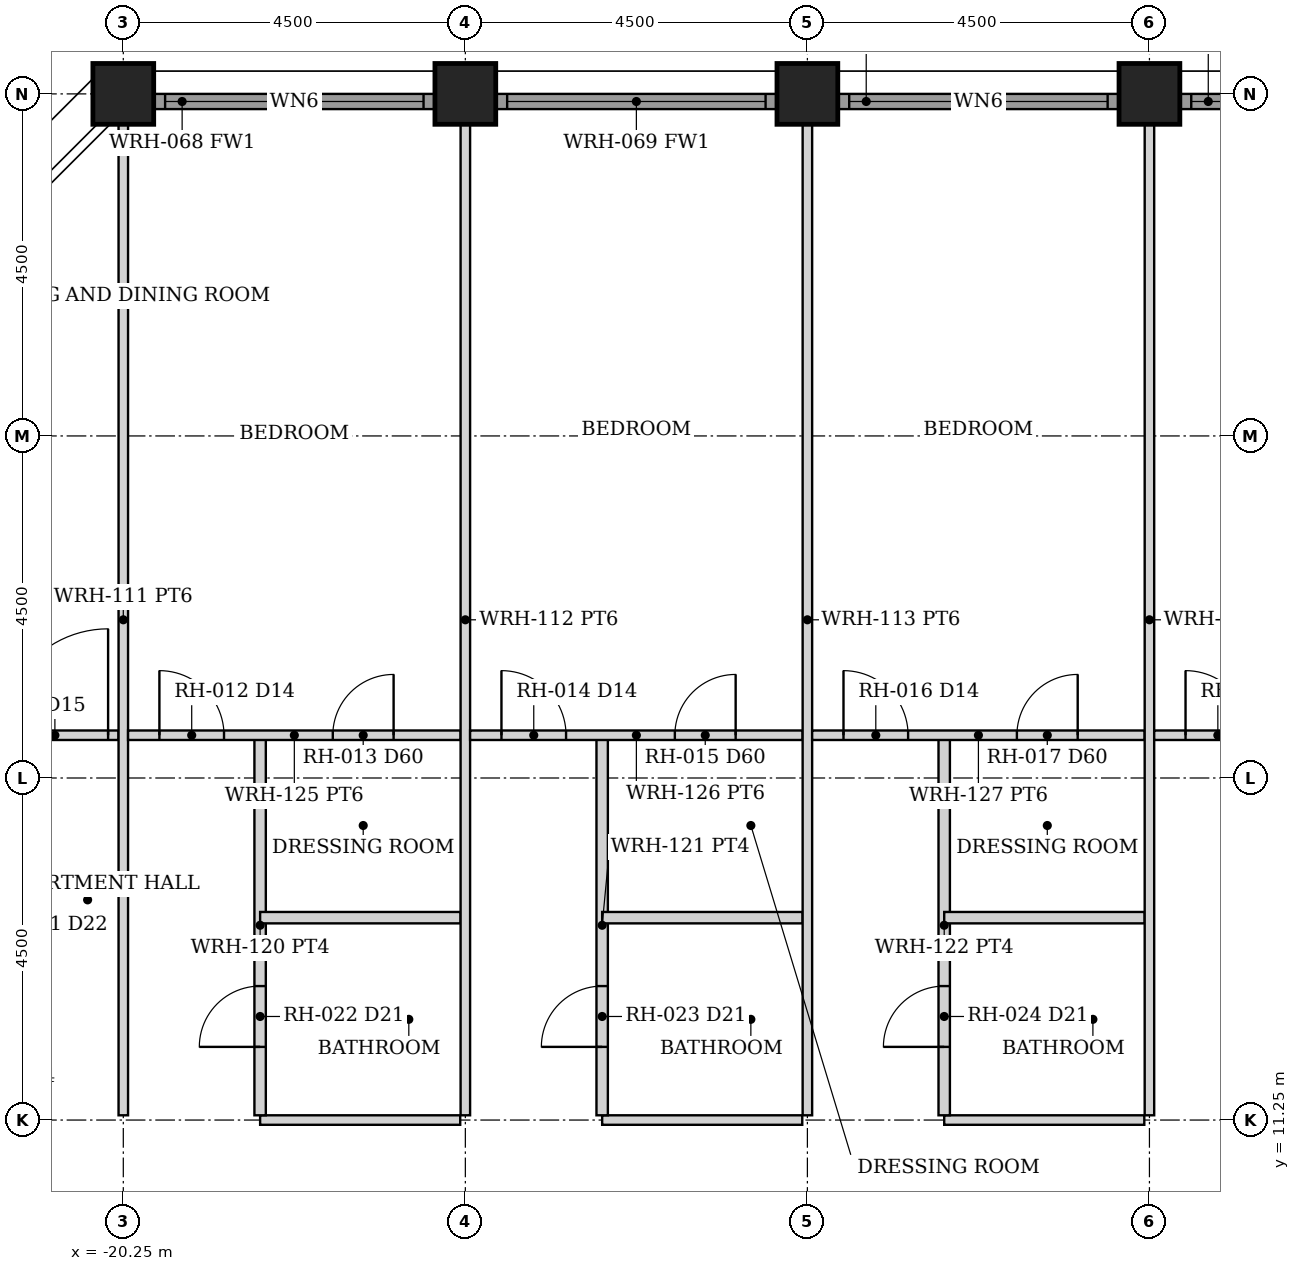
"""IFC4 building model, lengths in metres.
Left out: names, types, materials, properties, quantities, classifications, styles, units other than length and angle.
Written with IfcOpenShell. Run it as: python <this file> out.ifc"""

import sys

from ifc_helpers import new_model, si_unit, direction, frame, frame_2d, origin, origin_2d, place, context, subcontext, project, spatial, rectangle, hollow_rectangle, extrude, element, fill, save


model = new_model("IFC4")
c1 = context("Model", 3, precision=1e-05, world=origin(), true_north=direction((0.0, 1.0)))
c2 = subcontext(c1, "Body", "Model", "MODEL_VIEW")
j1 = project(units=[si_unit("LENGTHUNIT", "METRE"), si_unit("PLANEANGLEUNIT", "RADIAN")], contexts=[c1])
p1 = place(None, origin())
s1 = spatial("IfcSite", under=j1, at=p1, CompositionType="ELEMENT")
p2 = place(p1, origin())
s2 = spatial("IfcBuilding", under=s1, at=p2, CompositionType="ELEMENT")
p3 = place(p2, frame((0.0, 0.0, 103.5)))
s3 = spatial("IfcBuildingStorey", under=s2, at=p3, CompositionType="ELEMENT", Elevation=103.5)
for number, where, z_axis, x_axis in (
    (1, (-20.25, 24.75, 0.0), (0.0, 0.0, 1.0), (0.0, 1.0, 0.0)),
    (2, (-15.75, 24.75, 0.0), (0.0, 0.0, 1.0), (0.0, 1.0, 0.0)),
    (3, (-11.25, 24.75, 0.0), (0.0, 0.0, 1.0), (0.0, 1.0, 0.0)),
    (4, (-6.75, 24.75, 0.0), (0.0, 0.0, 1.0), (0.0, 1.0, 0.0)),
):
    element("IfcColumn", number, at=place(p3, frame(where, z_axis=z_axis, x_axis=x_axis)), inside=s3, PredefinedType="COLUMN", context=c2, shape_type="SweptSolid", body=[
        extrude(hollow_rectangle(XDim=0.8, YDim=0.8, WallThickness=0.06, at=origin_2d()), origin(), (0.0, 0.0, 1.0), 3.5),
    ])
p4 = place(p3, frame((-19.845, 24.65, 0.0), z_axis=(0.0, 0.0, 1.0), x_axis=(1.0, 0.0, 0.0)))
e5 = element("IfcWall", 5, at=p4, inside=s3, PredefinedType="SOLIDWALL", context=c2, shape_type="SweptSolid", body=[
    extrude(rectangle(XDim=3.69, YDim=0.2, at=frame_2d((1.845, 0.0))), origin(), (0.0, 0.0, 1.0), 2.279),
])
p5 = place(p4, frame((0.145, 0.0, 0.3)))
e6 = element("IfcOpeningElement", 6, at=p5, cuts=e5, PredefinedType="OPENING", context=c2, shape_type="SweptSolid", body=[
    extrude(rectangle(XDim=3.4, YDim=1.829, at=frame_2d((1.7, 0.915))), frame((0.0, 0.11, 0.0), z_axis=(0.0, -1.0, 0.0), x_axis=(1.0, 0.0, 0.0)), (0.0, 0.0, 1.0), 0.22),
])
p6 = place(p3, frame((-15.345, 24.65, 0.0), z_axis=(0.0, 0.0, 1.0), x_axis=(1.0, 0.0, 0.0)))
e7 = element("IfcWall", 7, at=p6, inside=s3, PredefinedType="SOLIDWALL", context=c2, shape_type="SweptSolid", body=[
    extrude(rectangle(XDim=3.69, YDim=0.2, at=frame_2d((1.845, 0.0))), origin(), (0.0, 0.0, 1.0), 2.279),
])
p7 = place(p6, frame((0.145, 0.0, 0.3)))
e8 = element("IfcOpeningElement", 8, at=p7, cuts=e7, PredefinedType="OPENING", context=c2, shape_type="SweptSolid", body=[
    extrude(rectangle(XDim=3.4, YDim=1.829, at=frame_2d((1.7, 0.915))), frame((0.0, 0.11, 0.0), z_axis=(0.0, -1.0, 0.0), x_axis=(1.0, 0.0, 0.0)), (0.0, 0.0, 1.0), 0.22),
])
p8 = place(p3, frame((-10.845, 24.65, 0.0), z_axis=(0.0, 0.0, 1.0), x_axis=(1.0, 0.0, 0.0)))
e9 = element("IfcWall", 9, at=p8, inside=s3, PredefinedType="SOLIDWALL", context=c2, shape_type="SweptSolid", body=[
    extrude(rectangle(XDim=3.69, YDim=0.2, at=frame_2d((1.845, 0.0))), origin(), (0.0, 0.0, 1.0), 2.279),
])
p9 = place(p8, frame((0.145, 0.0, 0.3)))
e10 = element("IfcOpeningElement", 10, at=p9, cuts=e9, PredefinedType="OPENING", context=c2, shape_type="SweptSolid", body=[
    extrude(rectangle(XDim=3.4, YDim=1.829, at=frame_2d((1.7, 0.915))), frame((0.0, 0.11, 0.0), z_axis=(0.0, -1.0, 0.0), x_axis=(1.0, 0.0, 0.0)), (0.0, 0.0, 1.0), 0.22),
])
p10 = place(p3, frame((-6.345, 24.65, 0.0), z_axis=(0.0, 0.0, 1.0), x_axis=(1.0, 0.0, 0.0)))
e11 = element("IfcWall", 11, at=p10, inside=s3, PredefinedType="SOLIDWALL", context=c2, shape_type="SweptSolid", body=[
    extrude(rectangle(XDim=3.69, YDim=0.2, at=frame_2d((1.845, 0.0))), origin(), (0.0, 0.0, 1.0), 2.279),
])
p11 = place(p10, frame((0.145, 0.0, 0.3)))
e12 = element("IfcOpeningElement", 12, at=p11, cuts=e11, PredefinedType="OPENING", context=c2, shape_type="SweptSolid", body=[
    extrude(rectangle(XDim=3.4, YDim=1.829, at=frame_2d((1.7, 0.915))), frame((0.0, 0.11, 0.0), z_axis=(0.0, -1.0, 0.0), x_axis=(1.0, 0.0, 0.0)), (0.0, 0.0, 1.0), 0.22),
])
p12 = place(p3, frame((-24.55, 16.312, 0.0), z_axis=(0.0, 0.0, 1.0), x_axis=(1.0, 0.0, 0.0)))
e13 = element("IfcWall", 13, at=p12, inside=s3, PredefinedType="PARTITIONING", context=c2, shape_type="SweptSolid", body=[
    extrude(rectangle(XDim=4.238, YDim=0.125, at=frame_2d((2.119, 0.0))), origin(), (0.0, 0.0, 1.0), 2.279),
])
p13 = place(p12, frame((2.7, 0.0, 0.0)))
e14 = element("IfcOpeningElement", 14, at=p13, cuts=e13, PredefinedType="OPENING", context=c2, shape_type="SweptSolid", body=[
    extrude(rectangle(XDim=1.4, YDim=2.1, at=frame_2d((0.7, 1.05))), frame((0.0, 0.073, 0.0), z_axis=(0.0, -1.0, 0.0), x_axis=(1.0, 0.0, 0.0)), (0.0, 0.0, 1.0), 0.145),
])
p14 = place(p3, frame((-20.25, 11.312, 0.0), z_axis=(0.0, 0.0, 1.0), x_axis=(0.0, 1.0, 0.0)))
e15 = element("IfcWall", 15, at=p14, inside=s3, PredefinedType="PARTITIONING", context=c2, shape_type="SweptSolid", body=[
    extrude(rectangle(XDim=13.038, YDim=0.125, at=frame_2d((6.519, 0.0))), origin(), (0.0, 0.0, 1.0), 2.279),
])
p15 = place(p3, frame((-18.45, 11.25, 0.0), z_axis=(0.0, 0.0, 1.0), x_axis=(1.0, 0.0, 0.0)))
e16 = element("IfcWall", 16, at=p15, inside=s3, PredefinedType="PARTITIONING", context=c2, shape_type="SweptSolid", body=[
    extrude(rectangle(XDim=2.633, YDim=0.125, at=frame_2d((1.316, 0.0))), origin(), (0.0, 0.0, 1.0), 2.279),
])
p16 = place(p3, frame((-18.45, 11.312, 0.0), z_axis=(0.0, 0.0, 1.0), x_axis=(0.0, 1.0, 0.0)))
e17 = element("IfcWall", 17, at=p16, inside=s3, PredefinedType="PARTITIONING", context=c2, shape_type="SweptSolid", body=[
    extrude(rectangle(XDim=5.0, YDim=0.15, at=frame_2d((2.5, 0.0))), origin(), (0.0, 0.0, 1.0), 2.279),
])
p17 = place(p16, frame((0.9, 0.0, 0.0)))
e18 = element("IfcOpeningElement", 18, at=p17, cuts=e17, PredefinedType="OPENING", context=c2, shape_type="SweptSolid", body=[
    extrude(rectangle(XDim=0.8, YDim=2.1, at=frame_2d((0.4, 1.05))), frame((0.0, 0.085, 0.0), z_axis=(0.0, -1.0, 0.0), x_axis=(1.0, 0.0, 0.0)), (0.0, 0.0, 1.0), 0.17),
])
p18 = place(p3, frame((-20.188, 16.312, 0.0), z_axis=(0.0, 0.0, 1.0), x_axis=(1.0, 0.0, 0.0)))
e19 = element("IfcWall", 19, at=p18, inside=s3, PredefinedType="PARTITIONING", context=c2, shape_type="SweptSolid", body=[
    extrude(rectangle(XDim=4.375, YDim=0.125, at=frame_2d((2.188, 0.0))), origin(), (0.0, 0.0, 1.0), 2.279),
])
p19 = place(p18, frame((0.413, 0.0, 0.0)))
e20 = element("IfcOpeningElement", 20, at=p19, cuts=e19, PredefinedType="OPENING", context=c2, shape_type="SweptSolid", body=[
    extrude(rectangle(XDim=0.85, YDim=2.1, at=frame_2d((0.425, 1.05))), frame((0.0, 0.073, 0.0), z_axis=(0.0, -1.0, 0.0), x_axis=(1.0, 0.0, 0.0)), (0.0, 0.0, 1.0), 0.145),
])
p20 = place(p18, frame((2.694, 0.0, 0.0)))
e21 = element("IfcOpeningElement", 21, at=p20, cuts=e19, PredefinedType="OPENING", context=c2, shape_type="SweptSolid", body=[
    extrude(rectangle(XDim=0.8, YDim=2.1, at=frame_2d((0.4, 1.05))), frame((0.0, 0.073, 0.0), z_axis=(0.0, -1.0, 0.0), x_axis=(1.0, 0.0, 0.0)), (0.0, 0.0, 1.0), 0.145),
])
p21 = place(p3, frame((-18.45, 13.913, 0.0), z_axis=(0.0, 0.0, 1.0), x_axis=(1.0, 0.0, 0.0)))
e22 = element("IfcWall", 22, at=p21, inside=s3, PredefinedType="PARTITIONING", context=c2, shape_type="SweptSolid", body=[
    extrude(rectangle(XDim=2.637, YDim=0.15, at=frame_2d((1.319, 0.0))), origin(), (0.0, 0.0, 1.0), 2.279),
])
p22 = place(p3, frame((-15.75, 11.312, 0.0), z_axis=(0.0, 0.0, 1.0), x_axis=(0.0, 1.0, 0.0)))
e23 = element("IfcWall", 23, at=p22, inside=s3, PredefinedType="PARTITIONING", context=c2, shape_type="SweptSolid", body=[
    extrude(rectangle(XDim=13.038, YDim=0.125, at=frame_2d((6.519, 0.0))), origin(), (0.0, 0.0, 1.0), 2.279),
])
p23 = place(p3, frame((-13.95, 11.25, 0.0), z_axis=(0.0, 0.0, 1.0), x_axis=(1.0, 0.0, 0.0)))
e24 = element("IfcWall", 24, at=p23, inside=s3, PredefinedType="PARTITIONING", context=c2, shape_type="SweptSolid", body=[
    extrude(rectangle(XDim=2.633, YDim=0.125, at=frame_2d((1.316, 0.0))), origin(), (0.0, 0.0, 1.0), 2.279),
])
p24 = place(p3, frame((-13.95, 11.312, 0.0), z_axis=(0.0, 0.0, 1.0), x_axis=(0.0, 1.0, 0.0)))
e25 = element("IfcWall", 25, at=p24, inside=s3, PredefinedType="PARTITIONING", context=c2, shape_type="SweptSolid", body=[
    extrude(rectangle(XDim=5.0, YDim=0.15, at=frame_2d((2.5, 0.0))), origin(), (0.0, 0.0, 1.0), 2.279),
])
p25 = place(p24, frame((0.9, 0.0, 0.0)))
e26 = element("IfcOpeningElement", 26, at=p25, cuts=e25, PredefinedType="OPENING", context=c2, shape_type="SweptSolid", body=[
    extrude(rectangle(XDim=0.8, YDim=2.1, at=frame_2d((0.4, 1.05))), frame((0.0, 0.085, 0.0), z_axis=(0.0, -1.0, 0.0), x_axis=(1.0, 0.0, 0.0)), (0.0, 0.0, 1.0), 0.17),
])
p26 = place(p3, frame((-15.688, 16.312, 0.0), z_axis=(0.0, 0.0, 1.0), x_axis=(1.0, 0.0, 0.0)))
e27 = element("IfcWall", 27, at=p26, inside=s3, PredefinedType="PARTITIONING", context=c2, shape_type="SweptSolid", body=[
    extrude(rectangle(XDim=4.375, YDim=0.125, at=frame_2d((2.188, 0.0))), origin(), (0.0, 0.0, 1.0), 2.279),
])
p27 = place(p26, frame((0.413, 0.0, 0.0)))
e28 = element("IfcOpeningElement", 28, at=p27, cuts=e27, PredefinedType="OPENING", context=c2, shape_type="SweptSolid", body=[
    extrude(rectangle(XDim=0.85, YDim=2.1, at=frame_2d((0.425, 1.05))), frame((0.0, 0.073, 0.0), z_axis=(0.0, -1.0, 0.0), x_axis=(1.0, 0.0, 0.0)), (0.0, 0.0, 1.0), 0.145),
])
p28 = place(p26, frame((2.694, 0.0, 0.0)))
e29 = element("IfcOpeningElement", 29, at=p28, cuts=e27, PredefinedType="OPENING", context=c2, shape_type="SweptSolid", body=[
    extrude(rectangle(XDim=0.8, YDim=2.1, at=frame_2d((0.4, 1.05))), frame((0.0, 0.073, 0.0), z_axis=(0.0, -1.0, 0.0), x_axis=(1.0, 0.0, 0.0)), (0.0, 0.0, 1.0), 0.145),
])
p29 = place(p3, frame((-13.95, 13.913, 0.0), z_axis=(0.0, 0.0, 1.0), x_axis=(1.0, 0.0, 0.0)))
e30 = element("IfcWall", 30, at=p29, inside=s3, PredefinedType="PARTITIONING", context=c2, shape_type="SweptSolid", body=[
    extrude(rectangle(XDim=2.637, YDim=0.15, at=frame_2d((1.319, 0.0))), origin(), (0.0, 0.0, 1.0), 2.279),
])
p30 = place(p3, frame((-11.25, 11.312, 0.0), z_axis=(0.0, 0.0, 1.0), x_axis=(0.0, 1.0, 0.0)))
e31 = element("IfcWall", 31, at=p30, inside=s3, PredefinedType="PARTITIONING", context=c2, shape_type="SweptSolid", body=[
    extrude(rectangle(XDim=13.038, YDim=0.125, at=frame_2d((6.519, 0.0))), origin(), (0.0, 0.0, 1.0), 2.279),
])
p31 = place(p3, frame((-9.45, 11.25, 0.0), z_axis=(0.0, 0.0, 1.0), x_axis=(1.0, 0.0, 0.0)))
e32 = element("IfcWall", 32, at=p31, inside=s3, PredefinedType="PARTITIONING", context=c2, shape_type="SweptSolid", body=[
    extrude(rectangle(XDim=2.633, YDim=0.125, at=frame_2d((1.316, 0.0))), origin(), (0.0, 0.0, 1.0), 2.279),
])
p32 = place(p3, frame((-9.45, 11.312, 0.0), z_axis=(0.0, 0.0, 1.0), x_axis=(0.0, 1.0, 0.0)))
e33 = element("IfcWall", 33, at=p32, inside=s3, PredefinedType="PARTITIONING", context=c2, shape_type="SweptSolid", body=[
    extrude(rectangle(XDim=5.0, YDim=0.15, at=frame_2d((2.5, 0.0))), origin(), (0.0, 0.0, 1.0), 2.279),
])
p33 = place(p32, frame((0.9, 0.0, 0.0)))
e34 = element("IfcOpeningElement", 34, at=p33, cuts=e33, PredefinedType="OPENING", context=c2, shape_type="SweptSolid", body=[
    extrude(rectangle(XDim=0.8, YDim=2.1, at=frame_2d((0.4, 1.05))), frame((0.0, 0.085, 0.0), z_axis=(0.0, -1.0, 0.0), x_axis=(1.0, 0.0, 0.0)), (0.0, 0.0, 1.0), 0.17),
])
p34 = place(p3, frame((-11.188, 16.312, 0.0), z_axis=(0.0, 0.0, 1.0), x_axis=(1.0, 0.0, 0.0)))
e35 = element("IfcWall", 35, at=p34, inside=s3, PredefinedType="PARTITIONING", context=c2, shape_type="SweptSolid", body=[
    extrude(rectangle(XDim=4.375, YDim=0.125, at=frame_2d((2.188, 0.0))), origin(), (0.0, 0.0, 1.0), 2.279),
])
p35 = place(p34, frame((0.413, 0.0, 0.0)))
e36 = element("IfcOpeningElement", 36, at=p35, cuts=e35, PredefinedType="OPENING", context=c2, shape_type="SweptSolid", body=[
    extrude(rectangle(XDim=0.85, YDim=2.1, at=frame_2d((0.425, 1.05))), frame((0.0, 0.073, 0.0), z_axis=(0.0, -1.0, 0.0), x_axis=(1.0, 0.0, 0.0)), (0.0, 0.0, 1.0), 0.145),
])
p36 = place(p34, frame((2.694, 0.0, 0.0)))
e37 = element("IfcOpeningElement", 37, at=p36, cuts=e35, PredefinedType="OPENING", context=c2, shape_type="SweptSolid", body=[
    extrude(rectangle(XDim=0.8, YDim=2.1, at=frame_2d((0.4, 1.05))), frame((0.0, 0.073, 0.0), z_axis=(0.0, -1.0, 0.0), x_axis=(1.0, 0.0, 0.0)), (0.0, 0.0, 1.0), 0.145),
])
p37 = place(p3, frame((-9.45, 13.913, 0.0), z_axis=(0.0, 0.0, 1.0), x_axis=(1.0, 0.0, 0.0)))
e38 = element("IfcWall", 38, at=p37, inside=s3, PredefinedType="PARTITIONING", context=c2, shape_type="SweptSolid", body=[
    extrude(rectangle(XDim=2.637, YDim=0.15, at=frame_2d((1.319, 0.0))), origin(), (0.0, 0.0, 1.0), 2.279),
])
p38 = place(p3, frame((-6.75, 11.312, 0.0), z_axis=(0.0, 0.0, 1.0), x_axis=(0.0, 1.0, 0.0)))
e39 = element("IfcWall", 39, at=p38, inside=s3, PredefinedType="PARTITIONING", context=c2, shape_type="SweptSolid", body=[
    extrude(rectangle(XDim=13.038, YDim=0.125, at=frame_2d((6.519, 0.0))), origin(), (0.0, 0.0, 1.0), 2.279),
])
p39 = place(p3, frame((-6.688, 16.312, 0.0), z_axis=(0.0, 0.0, 1.0), x_axis=(1.0, 0.0, 0.0)))
e40 = element("IfcWall", 40, at=p39, inside=s3, PredefinedType="PARTITIONING", context=c2, shape_type="SweptSolid", body=[
    extrude(rectangle(XDim=4.37, YDim=0.125, at=frame_2d((2.185, 0.0))), origin(), (0.0, 0.0, 1.0), 2.279),
])
p40 = place(p39, frame((0.413, 0.0, 0.0)))
e41 = element("IfcOpeningElement", 41, at=p40, cuts=e40, PredefinedType="OPENING", context=c2, shape_type="SweptSolid", body=[
    extrude(rectangle(XDim=0.85, YDim=2.1, at=frame_2d((0.425, 1.05))), frame((0.0, 0.073, 0.0), z_axis=(0.0, -1.0, 0.0), x_axis=(1.0, 0.0, 0.0)), (0.0, 0.0, 1.0), 0.145),
])
p41 = place(p39, frame((2.694, 0.0, 0.0)))
e42 = element("IfcOpeningElement", 42, at=p41, cuts=e40, PredefinedType="OPENING", context=c2, shape_type="SweptSolid", body=[
    extrude(rectangle(XDim=0.8, YDim=2.1, at=frame_2d((0.4, 1.05))), frame((0.0, 0.073, 0.0), z_axis=(0.0, -1.0, 0.0), x_axis=(1.0, 0.0, 0.0)), (0.0, 0.0, 1.0), 0.145),
])
p42 = place(p5, origin())
e43 = element("IfcWindow", 43, at=p42, inside=s3, PartitioningType="SINGLE_PANEL", PredefinedType="WINDOW", context=c2, shape_type="SweptSolid", body=[
    extrude(rectangle(XDim=3.4, YDim=1.829, at=frame_2d((1.7, 0.915))), frame((0.0, 0.03, 0.0), z_axis=(0.0, -1.0, 0.0), x_axis=(1.0, 0.0, 0.0)), (0.0, 0.0, 1.0), 0.06),
])
fill(e6, e43)
p43 = place(p7, origin())
e44 = element("IfcWindow", 44, at=p43, inside=s3, PartitioningType="SINGLE_PANEL", PredefinedType="WINDOW", context=c2, shape_type="SweptSolid", body=[
    extrude(rectangle(XDim=3.4, YDim=1.829, at=frame_2d((1.7, 0.915))), frame((0.0, 0.03, 0.0), z_axis=(0.0, -1.0, 0.0), x_axis=(1.0, 0.0, 0.0)), (0.0, 0.0, 1.0), 0.06),
])
fill(e8, e44)
p44 = place(p9, origin())
e45 = element("IfcWindow", 45, at=p44, inside=s3, PartitioningType="SINGLE_PANEL", PredefinedType="WINDOW", context=c2, shape_type="SweptSolid", body=[
    extrude(rectangle(XDim=3.4, YDim=1.829, at=frame_2d((1.7, 0.915))), frame((0.0, 0.03, 0.0), z_axis=(0.0, -1.0, 0.0), x_axis=(1.0, 0.0, 0.0)), (0.0, 0.0, 1.0), 0.06),
])
fill(e10, e45)
p45 = place(p11, origin())
e46 = element("IfcWindow", 46, at=p45, inside=s3, PartitioningType="SINGLE_PANEL", PredefinedType="WINDOW", context=c2, shape_type="SweptSolid", body=[
    extrude(rectangle(XDim=3.4, YDim=1.829, at=frame_2d((1.7, 0.915))), frame((0.0, 0.03, 0.0), z_axis=(0.0, -1.0, 0.0), x_axis=(1.0, 0.0, 0.0)), (0.0, 0.0, 1.0), 0.06),
])
fill(e12, e46)
p46 = place(p13, origin())
e47 = element("IfcDoor", 47, at=p46, inside=s3, OperationType="SINGLE_SWING_RIGHT", PredefinedType="DOOR", context=c2, shape_type="SweptSolid", body=[
    extrude(rectangle(XDim=1.4, YDim=2.1, at=frame_2d((0.7, 1.05))), frame((0.0, 0.025, 0.0), z_axis=(0.0, -1.0, 0.0), x_axis=(1.0, 0.0, 0.0)), (0.0, 0.0, 1.0), 0.05),
])
fill(e14, e47)
p47 = place(p19, origin())
e48 = element("IfcDoor", 48, at=p47, inside=s3, OperationType="SINGLE_SWING_LEFT", PredefinedType="DOOR", context=c2, shape_type="SweptSolid", body=[
    extrude(rectangle(XDim=0.85, YDim=2.1, at=frame_2d((0.425, 1.05))), frame((0.0, 0.025, 0.0), z_axis=(0.0, -1.0, 0.0), x_axis=(1.0, 0.0, 0.0)), (0.0, 0.0, 1.0), 0.05),
])
fill(e20, e48)
p48 = place(p17, origin())
e49 = element("IfcDoor", 49, at=p48, inside=s3, OperationType="SINGLE_SWING_LEFT", PredefinedType="DOOR", context=c2, shape_type="SweptSolid", body=[
    extrude(rectangle(XDim=0.8, YDim=2.1, at=frame_2d((0.4, 1.05))), frame((0.0, 0.025, 0.0), z_axis=(0.0, -1.0, 0.0), x_axis=(1.0, 0.0, 0.0)), (0.0, 0.0, 1.0), 0.05),
])
fill(e18, e49)
p49 = place(p20, origin())
e50 = element("IfcDoor", 50, at=p49, inside=s3, OperationType="SINGLE_SWING_RIGHT", PredefinedType="DOOR", context=c2, shape_type="SweptSolid", body=[
    extrude(rectangle(XDim=0.8, YDim=2.1, at=frame_2d((0.4, 1.05))), frame((0.0, 0.025, 0.0), z_axis=(0.0, -1.0, 0.0), x_axis=(1.0, 0.0, 0.0)), (0.0, 0.0, 1.0), 0.05),
])
fill(e21, e50)
p50 = place(p27, origin())
e51 = element("IfcDoor", 51, at=p50, inside=s3, OperationType="SINGLE_SWING_LEFT", PredefinedType="DOOR", context=c2, shape_type="SweptSolid", body=[
    extrude(rectangle(XDim=0.85, YDim=2.1, at=frame_2d((0.425, 1.05))), frame((0.0, 0.025, 0.0), z_axis=(0.0, -1.0, 0.0), x_axis=(1.0, 0.0, 0.0)), (0.0, 0.0, 1.0), 0.05),
])
fill(e28, e51)
p51 = place(p25, origin())
e52 = element("IfcDoor", 52, at=p51, inside=s3, OperationType="SINGLE_SWING_LEFT", PredefinedType="DOOR", context=c2, shape_type="SweptSolid", body=[
    extrude(rectangle(XDim=0.8, YDim=2.1, at=frame_2d((0.4, 1.05))), frame((0.0, 0.025, 0.0), z_axis=(0.0, -1.0, 0.0), x_axis=(1.0, 0.0, 0.0)), (0.0, 0.0, 1.0), 0.05),
])
fill(e26, e52)
p52 = place(p28, origin())
e53 = element("IfcDoor", 53, at=p52, inside=s3, OperationType="SINGLE_SWING_RIGHT", PredefinedType="DOOR", context=c2, shape_type="SweptSolid", body=[
    extrude(rectangle(XDim=0.8, YDim=2.1, at=frame_2d((0.4, 1.05))), frame((0.0, 0.025, 0.0), z_axis=(0.0, -1.0, 0.0), x_axis=(1.0, 0.0, 0.0)), (0.0, 0.0, 1.0), 0.05),
])
fill(e29, e53)
p53 = place(p35, origin())
e54 = element("IfcDoor", 54, at=p53, inside=s3, OperationType="SINGLE_SWING_LEFT", PredefinedType="DOOR", context=c2, shape_type="SweptSolid", body=[
    extrude(rectangle(XDim=0.85, YDim=2.1, at=frame_2d((0.425, 1.05))), frame((0.0, 0.025, 0.0), z_axis=(0.0, -1.0, 0.0), x_axis=(1.0, 0.0, 0.0)), (0.0, 0.0, 1.0), 0.05),
])
fill(e36, e54)
p54 = place(p33, origin())
e55 = element("IfcDoor", 55, at=p54, inside=s3, OperationType="SINGLE_SWING_LEFT", PredefinedType="DOOR", context=c2, shape_type="SweptSolid", body=[
    extrude(rectangle(XDim=0.8, YDim=2.1, at=frame_2d((0.4, 1.05))), frame((0.0, 0.025, 0.0), z_axis=(0.0, -1.0, 0.0), x_axis=(1.0, 0.0, 0.0)), (0.0, 0.0, 1.0), 0.05),
])
fill(e34, e55)
p55 = place(p36, origin())
e56 = element("IfcDoor", 56, at=p55, inside=s3, OperationType="SINGLE_SWING_RIGHT", PredefinedType="DOOR", context=c2, shape_type="SweptSolid", body=[
    extrude(rectangle(XDim=0.8, YDim=2.1, at=frame_2d((0.4, 1.05))), frame((0.0, 0.025, 0.0), z_axis=(0.0, -1.0, 0.0), x_axis=(1.0, 0.0, 0.0)), (0.0, 0.0, 1.0), 0.05),
])
fill(e37, e56)
p56 = place(p40, origin())
e57 = element("IfcDoor", 57, at=p56, inside=s3, OperationType="SINGLE_SWING_LEFT", PredefinedType="DOOR", context=c2, shape_type="SweptSolid", body=[
    extrude(rectangle(XDim=0.85, YDim=2.1, at=frame_2d((0.425, 1.05))), frame((0.0, 0.025, 0.0), z_axis=(0.0, -1.0, 0.0), x_axis=(1.0, 0.0, 0.0)), (0.0, 0.0, 1.0), 0.05),
])
fill(e41, e57)
save(model, sys.argv[1])
